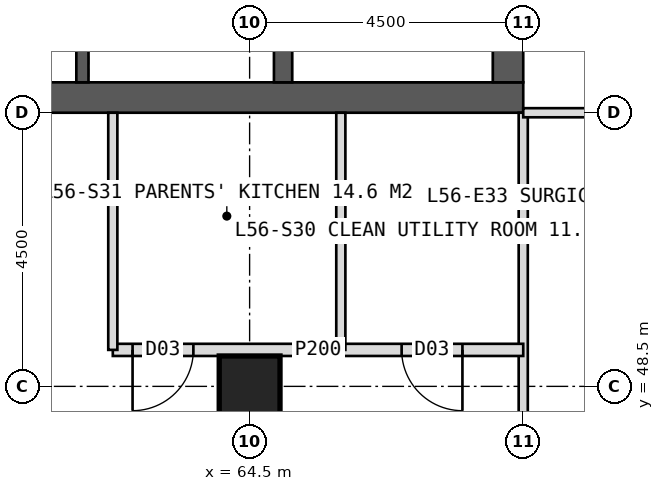
"""IFC4 building model, lengths in metres.
Left out: names, types, materials, properties, quantities, classifications, styles, units other than length and angle.
Written with IfcOpenShell. Run it as: python <this file> out.ifc"""

import sys

from ifc_helpers import new_model, si_unit, direction, frame, frame_2d, origin, origin_2d, place, context, subcontext, project, spatial, rectangle, hollow_rectangle, extrude, element, fill, save


model = new_model("IFC4")
c1 = context("Model", 3, precision=1e-05, world=origin(), true_north=direction((0.0, 1.0)))
c2 = subcontext(c1, "Body", "Model", "MODEL_VIEW")
j1 = project(units=[si_unit("LENGTHUNIT", "METRE"), si_unit("PLANEANGLEUNIT", "RADIAN")], contexts=[c1])
p1 = place(None, origin())
s1 = spatial("IfcSite", under=j1, at=p1, CompositionType="ELEMENT")
p2 = place(p1, origin())
s2 = spatial("IfcBuilding", under=s1, at=p2, CompositionType="ELEMENT")
p3 = place(p2, frame((0.0, 0.0, 233.0)))
s3 = spatial("IfcBuildingStorey", under=s2, at=p3, CompositionType="ELEMENT", Elevation=233.0)
p4 = place(p3, frame((51.0, 53.25, 0.0), z_axis=(0.0, 0.0, 1.0), x_axis=(1.0, 0.0, 0.0)))
e1 = element("IfcWall", 1, at=p4, inside=s3, PredefinedType="SHEAR", context=c2, shape_type="SweptSolid", body=[
    extrude(rectangle(XDim=18.0, YDim=0.5, at=frame_2d((9.0, 0.0))), origin(), (0.0, 0.0, 1.0), 4.0),
])
p5 = place(p4, frame((8.1, 0.0, 0.0)))
e2 = element("IfcOpeningElement", 2, at=p5, cuts=e1, PredefinedType="OPENING", context=c2, shape_type="SweptSolid", body=[
    extrude(rectangle(XDim=1.8, YDim=2.2, at=frame_2d((0.9, 1.1))), frame((0.0, 0.26, 0.0), z_axis=(0.0, -1.0, 0.0), x_axis=(1.0, 0.0, 0.0)), (0.0, 0.0, 1.0), 0.52),
])
p6 = place(p3, frame((68.75, 53.5, 0.0), z_axis=(0.0, 0.0, 1.0), x_axis=(0.0, 1.0, 0.0)))
e3 = element("IfcWall", 3, at=p6, inside=s3, PredefinedType="SHEAR", context=c2, shape_type="SweptSolid", body=[
    extrude(rectangle(XDim=17.0, YDim=0.5, at=frame_2d((8.5, 0.0))), origin(), (0.0, 0.0, 1.0), 4.0),
])
p7 = place(p6, frame((9.6, 0.0, 0.0)))
e4 = element("IfcOpeningElement", 4, at=p7, cuts=e3, PredefinedType="OPENING", context=c2, shape_type="SweptSolid", body=[
    extrude(rectangle(XDim=1.5, YDim=2.2, at=frame_2d((0.75, 1.1))), frame((0.0, 0.26, 0.0), z_axis=(0.0, -1.0, 0.0), x_axis=(1.0, 0.0, 0.0)), (0.0, 0.0, 1.0), 0.52),
])
p8 = place(p3, frame((65.05, 53.5, 0.0), z_axis=(0.0, 0.0, 1.0), x_axis=(0.0, 1.0, 0.0)))
e5 = element("IfcWall", 5, at=p8, inside=s3, PredefinedType="SHEAR", context=c2, shape_type="SweptSolid", body=[
    extrude(rectangle(XDim=17.0, YDim=0.3, at=frame_2d((8.5, 0.0))), origin(), (0.0, 0.0, 1.0), 4.0),
])
p9 = place(p3, frame((61.75, 53.5, 0.0), z_axis=(0.0, 0.0, 1.0), x_axis=(0.0, 1.0, 0.0)))
e6 = element("IfcWall", 6, at=p9, inside=s3, PredefinedType="SHEAR", context=c2, shape_type="SweptSolid", body=[
    extrude(rectangle(XDim=17.0, YDim=0.2, at=frame_2d((8.5, 0.0))), origin(), (0.0, 0.0, 1.0), 4.0),
])
p10 = place(p9, frame((0.6, 0.0, 0.0)))
e7 = element("IfcOpeningElement", 7, at=p10, cuts=e6, PredefinedType="OPENING", context=c2, shape_type="SweptSolid", body=[
    extrude(rectangle(XDim=1.0, YDim=2.1, at=frame_2d((0.5, 1.05))), frame((0.0, 0.11, 0.0), z_axis=(0.0, -1.0, 0.0), x_axis=(1.0, 0.0, 0.0)), (0.0, 0.0, 1.0), 0.22),
])
p11 = place(p9, frame((2.75, 0.0, 0.0)))
e8 = element("IfcOpeningElement", 8, at=p11, cuts=e6, PredefinedType="OPENING", context=c2, shape_type="SweptSolid", body=[
    extrude(rectangle(XDim=1.0, YDim=2.1, at=frame_2d((0.5, 1.05))), frame((0.0, 0.11, 0.0), z_axis=(0.0, -1.0, 0.0), x_axis=(1.0, 0.0, 0.0)), (0.0, 0.0, 1.0), 0.22),
])
p12 = place(p9, frame((4.824, 0.0, 0.0)))
e9 = element("IfcOpeningElement", 9, at=p12, cuts=e6, PredefinedType="OPENING", context=c2, shape_type="SweptSolid", body=[
    extrude(rectangle(XDim=1.0, YDim=2.1, at=frame_2d((0.5, 1.05))), frame((0.0, 0.11, 0.0), z_axis=(0.0, -1.0, 0.0), x_axis=(1.0, 0.0, 0.0)), (0.0, 0.0, 1.0), 0.22),
])
p13 = place(p9, frame((6.924, 0.0, 0.0)))
e10 = element("IfcOpeningElement", 10, at=p13, cuts=e6, PredefinedType="OPENING", context=c2, shape_type="SweptSolid", body=[
    extrude(rectangle(XDim=1.0, YDim=2.1, at=frame_2d((0.5, 1.05))), frame((0.0, 0.11, 0.0), z_axis=(0.0, -1.0, 0.0), x_axis=(1.0, 0.0, 0.0)), (0.0, 0.0, 1.0), 0.22),
])
p14 = place(p9, frame((10.025, 0.0, 0.0)))
e11 = element("IfcOpeningElement", 11, at=p14, cuts=e6, PredefinedType="OPENING", context=c2, shape_type="SweptSolid", body=[
    extrude(rectangle(XDim=1.4, YDim=2.2, at=frame_2d((0.7, 1.1))), frame((0.0, 0.11, 0.0), z_axis=(0.0, -1.0, 0.0), x_axis=(1.0, 0.0, 0.0)), (0.0, 0.0, 1.0), 0.22),
])
p15 = place(p9, frame((14.325, 0.0, 0.0)))
e12 = element("IfcOpeningElement", 12, at=p15, cuts=e6, PredefinedType="OPENING", context=c2, shape_type="SweptSolid", body=[
    extrude(rectangle(XDim=1.4, YDim=2.2, at=frame_2d((0.7, 1.1))), frame((0.0, 0.11, 0.0), z_axis=(0.0, -1.0, 0.0), x_axis=(1.0, 0.0, 0.0)), (0.0, 0.0, 1.0), 0.22),
])
p16 = place(p3, frame((64.5, 48.5, 0.0), z_axis=(0.0, 0.0, 1.0), x_axis=(1.0, 0.0, 0.0)))
e13 = element("IfcColumn", 13, at=p16, inside=s3, PredefinedType="COLUMN", context=c2, shape_type="SweptSolid", body=[
    extrude(hollow_rectangle(XDim=1.0, YDim=1.0, WallThickness=0.1, at=origin_2d()), origin(), (0.0, 0.0, 1.0), 4.0),
])
p17 = place(p3, frame((69.0, 53.0, 0.0), z_axis=(0.0, 0.0, 1.0), x_axis=(0.0, -1.0, 0.0)))
e14 = element("IfcWall", 14, at=p17, inside=s3, PredefinedType="PARTITIONING", context=c2, shape_type="SweptSolid", body=[
    extrude(rectangle(XDim=5.4, YDim=0.15, at=frame_2d((2.7, 0.0))), origin(), (0.0, 0.0, 1.0), 3.75),
])
p18 = place(p3, frame((69.0, 49.1, 0.0), z_axis=(0.0, 0.0, 1.0), x_axis=(-1.0, 0.0, 0.0)))
e15 = element("IfcWall", 15, at=p18, inside=s3, PredefinedType="PARTITIONING", context=c2, shape_type="SweptSolid", body=[
    extrude(rectangle(XDim=6.75, YDim=0.2, at=frame_2d((3.375, 0.0))), origin(), (0.0, 0.0, 1.0), 3.75),
])
p19 = place(p18, frame((1.0, 0.0, 0.0)))
e16 = element("IfcOpeningElement", 16, at=p19, cuts=e15, PredefinedType="OPENING", context=c2, shape_type="SweptSolid", body=[
    extrude(rectangle(XDim=1.0, YDim=2.1, at=frame_2d((0.5, 1.05))), frame((0.0, 0.11, 0.0), z_axis=(0.0, -1.0, 0.0), x_axis=(1.0, 0.0, 0.0)), (0.0, 0.0, 1.0), 0.22),
])
p20 = place(p18, frame((5.425, 0.0, 0.0)))
e17 = element("IfcOpeningElement", 17, at=p20, cuts=e15, PredefinedType="OPENING", context=c2, shape_type="SweptSolid", body=[
    extrude(rectangle(XDim=1.0, YDim=2.1, at=frame_2d((0.5, 1.05))), frame((0.0, 0.11, 0.0), z_axis=(0.0, -1.0, 0.0), x_axis=(1.0, 0.0, 0.0)), (0.0, 0.0, 1.0), 0.22),
])
for number, where, z_axis, x_axis in (
    (18, (62.25, 53.0, 0.0), (0.0, 0.0, 1.0), (0.0, -1.0, 0.0)),
    (19, (66.0, 53.0, 0.0), (0.0, 0.0, 1.0), (0.0, -1.0, 0.0)),
):
    element("IfcWall", number, at=place(p3, frame(where, z_axis=z_axis, x_axis=x_axis)), inside=s3, PredefinedType="PARTITIONING", context=c2, shape_type="SweptSolid", body=[
        extrude(rectangle(XDim=3.9, YDim=0.15, at=frame_2d((1.95, 0.0))), origin(), (0.0, 0.0, 1.0), 3.75),
    ])
p21 = place(p3, frame((69.0, 53.0, 0.0), z_axis=(0.0, 0.0, 1.0), x_axis=(1.0, 0.0, 0.0)))
e20 = element("IfcWall", 20, at=p21, inside=s3, PredefinedType="PARTITIONING", context=c2, shape_type="SweptSolid", body=[
    extrude(rectangle(XDim=5.4, YDim=0.15, at=frame_2d((2.7, 0.0))), origin(), (0.0, 0.0, 1.0), 3.75),
])
p22 = place(p19, origin())
e21 = element("IfcDoor", 21, at=p22, inside=s3, OperationType="SINGLE_SWING_LEFT", PredefinedType="DOOR", context=c2, shape_type="SweptSolid", body=[
    extrude(rectangle(XDim=1.0, YDim=2.1, at=frame_2d((0.5, 1.05))), frame((0.0, 0.025, 0.0), z_axis=(0.0, -1.0, 0.0), x_axis=(1.0, 0.0, 0.0)), (0.0, 0.0, 1.0), 0.05),
])
fill(e16, e21)
p23 = place(p20, origin())
e22 = element("IfcDoor", 22, at=p23, inside=s3, OperationType="SINGLE_SWING_RIGHT", PredefinedType="DOOR", context=c2, shape_type="SweptSolid", body=[
    extrude(rectangle(XDim=1.0, YDim=2.1, at=frame_2d((0.5, 1.05))), frame((0.0, 0.025, 0.0), z_axis=(0.0, -1.0, 0.0), x_axis=(1.0, 0.0, 0.0)), (0.0, 0.0, 1.0), 0.05),
])
fill(e17, e22)
save(model, sys.argv[1])
